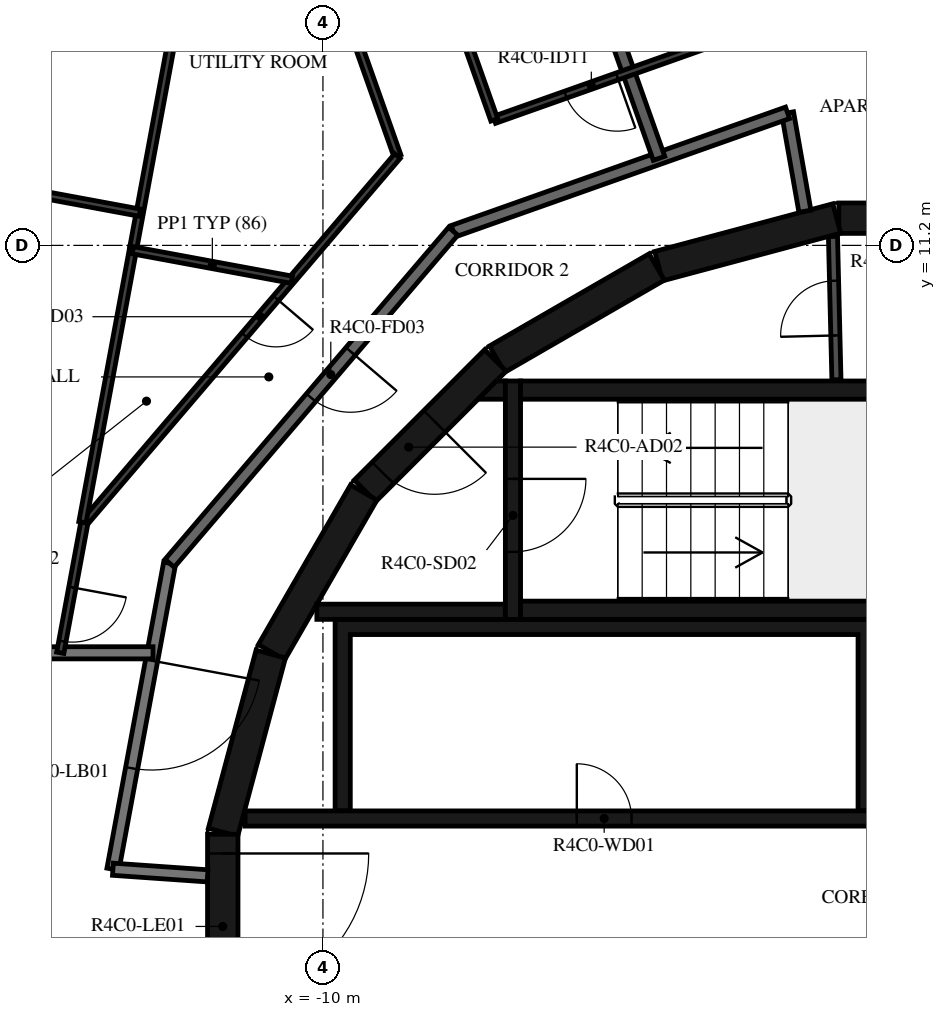
"""IFC4 building model, lengths in metres.
Left out: names, types, materials, properties, quantities, classifications, styles, units other than length and angle.
Written with IfcOpenShell. Run it as: python <this file> out.ifc"""

import sys

from ifc_helpers import new_model, si_unit, direction, frame, frame_2d, origin, place, context, subcontext, project, spatial, polyline, rectangle, outline, extrude, element, fill, save


model = new_model("IFC4")
c1 = context("Model", 3, precision=1e-05, world=origin(), true_north=direction((0.0, 1.0)))
c2 = subcontext(c1, "Body", "Model", "MODEL_VIEW")
j1 = project(units=[si_unit("LENGTHUNIT", "METRE"), si_unit("PLANEANGLEUNIT", "RADIAN")], contexts=[c1])
p1 = place(None, origin())
s1 = spatial("IfcSite", under=j1, at=p1, CompositionType="ELEMENT")
p2 = place(p1, origin())
s2 = spatial("IfcBuilding", under=s1, at=p2, CompositionType="ELEMENT")
p3 = place(p2, frame((0.0, 0.0, 179.7)))
s3 = spatial("IfcBuildingStorey", under=s2, at=p3, CompositionType="ELEMENT", Elevation=179.7)
for number, where, z_axis, x_axis in (
    (1, (1.516, 11.647, 0.0), (0.0, 0.0, 1.0), (-1.0, 0.0, 0.0)),
    (2, (-1.55, 11.643, 0.0), (0.0, 0.0, 1.0), (-0.966, -0.259, 0.0)),
    (3, (-4.51, 10.845, 0.0), (0.0, 0.0, 1.0), (-0.866, -0.5, 0.0)),
):
    element("IfcWall", number, at=place(p3, frame(where, z_axis=z_axis, x_axis=x_axis)), inside=s3, PredefinedType="SHEAR", context=c2, shape_type="SweptSolid", body=[
        extrude(rectangle(XDim=3.033, YDim=0.5, at=frame_2d((1.516, 0.0))), origin(), (0.0, 0.0, 1.0), 3.05),
    ])
p4 = place(p3, frame((-7.164, 9.308, 0.0), z_axis=(0.0, 0.0, 1.0), x_axis=(-0.707106781187, -0.707106781187, 0.0)))
e4 = element("IfcWall", 4, at=p4, inside=s3, PredefinedType="SHEAR", context=c2, shape_type="SweptSolid", body=[
    extrude(rectangle(XDim=3.032, YDim=0.5, at=frame_2d((1.516, 0.0))), origin(), (0.0, 0.0, 1.0), 3.05),
])
p5 = place(p4, frame((1.416, 0.0, 0.0)))
e5 = element("IfcOpeningElement", 5, at=p5, cuts=e4, PredefinedType="OPENING", context=c2, shape_type="SweptSolid", body=[
    extrude(rectangle(XDim=1.2, YDim=2.1, at=frame_2d((0.6, 1.05))), frame((0.0, 0.26, 0.0), z_axis=(0.0, -1.0, 0.0), x_axis=(1.0, 0.0, 0.0)), (0.0, 0.0, 1.0), 0.52),
])
for number, where, z_axis, x_axis in (
    (6, (-9.329, 7.137, 0.0), (0.0, 0.0, 1.0), (-0.5, -0.866, 0.0)),
    (7, (-10.858, 4.479, 0.0), (0.0, 0.0, 1.0), (-0.259, -0.966, 0.0)),
):
    element("IfcWall", number, at=place(p3, frame(where, z_axis=z_axis, x_axis=x_axis)), inside=s3, PredefinedType="SHEAR", context=c2, shape_type="SweptSolid", body=[
        extrude(rectangle(XDim=3.033, YDim=0.5, at=frame_2d((1.516, 0.0))), origin(), (0.0, 0.0, 1.0), 3.05),
    ])
p6 = place(p3, frame((-11.647, 1.516, 0.0), z_axis=(0.0, 0.0, 1.0), x_axis=(0.0, -1.0, 0.0)))
e8 = element("IfcWall", 8, at=p6, inside=s3, PredefinedType="SHEAR", context=c2, shape_type="SweptSolid", body=[
    extrude(rectangle(XDim=3.033, YDim=0.5, at=frame_2d((1.516, 0.0))), origin(), (0.0, 0.0, 1.0), 3.05),
])
p7 = place(p6, frame((0.316, 0.0, 0.0)))
e9 = element("IfcOpeningElement", 9, at=p7, cuts=e8, PredefinedType="OPENING", context=c2, shape_type="SweptSolid", body=[
    extrude(rectangle(XDim=2.4, YDim=2.1, at=frame_2d((1.2, 1.05))), frame((0.0, 0.26, 0.0), z_axis=(0.0, -1.0, 0.0), x_axis=(1.0, 0.0, 0.0)), (0.0, 0.0, 1.0), 0.52),
])
for number, where, z_axis, x_axis in (
    (10, (-6.75, 5.2, 0.0), (0.0, 0.0, 1.0), (1.0, 0.0, 0.0)),
    (11, (-6.75, 8.82, 0.0), (0.0, 0.0, 1.0), (1.0, 0.0, 0.0)),
):
    element("IfcWall", number, at=place(p3, frame(where, z_axis=z_axis, x_axis=x_axis)), inside=s3, PredefinedType="SHEAR", context=c2, shape_type="SweptSolid", body=[
        extrude(rectangle(XDim=6.75, YDim=0.3, at=frame_2d((3.375, 0.0))), origin(), (0.0, 0.0, 1.0), 3.05),
    ])
p8 = place(p3, frame((-6.875, 8.97, 0.0), z_axis=(0.0, 0.0, 1.0), x_axis=(0.0, -1.0, 0.0)))
e12 = element("IfcWall", 12, at=p8, inside=s3, PredefinedType="SHEAR", context=c2, shape_type="SweptSolid", body=[
    extrude(rectangle(XDim=3.92, YDim=0.25, at=frame_2d((1.96, 0.0))), origin(), (0.0, 0.0, 1.0), 3.05),
])
p9 = place(p8, frame((1.61, 0.0, 0.0)))
e13 = element("IfcOpeningElement", 13, at=p9, cuts=e12, PredefinedType="OPENING", context=c2, shape_type="SweptSolid", body=[
    extrude(rectangle(XDim=1.2, YDim=2.1, at=frame_2d((0.6, 1.05))), frame((0.0, 0.135, 0.0), z_axis=(0.0, -1.0, 0.0), x_axis=(1.0, 0.0, 0.0)), (0.0, 0.0, 1.0), 0.27),
])
p10 = place(p3, frame((-7.0, 5.175, 0.0), z_axis=(0.0, 0.0, 1.0), x_axis=(-1.0, 0.0, 0.0)))
e14 = element("IfcWall", 14, at=p10, inside=s3, PredefinedType="SHEAR", context=c2, shape_type="SweptSolid", body=[
    extrude(rectangle(XDim=3.1, YDim=0.25, at=frame_2d((1.55, 0.0))), origin(), (0.0, 0.0, 1.0), 3.05),
])
p11 = place(p3, origin())
e15 = element("IfcWall", 15, at=p11, inside=s3, PredefinedType="SHEAR", context=c2, shape_type="SweptSolid", body=[
    extrude(outline(polyline([(-7.148, 8.97), (-7.0, 8.97), (-7.0, 8.67), (-7.448, 8.67), (-7.148, 8.97)])), origin(), (0.0, 0.0, 1.0), 3.05),
])
p12 = place(p3, origin())
e16 = element("IfcWall", 16, at=p12, inside=s3, PredefinedType="SHEAR", context=c2, shape_type="SweptSolid", body=[
    extrude(outline(polyline([(-9.55, 4.8), (-1.2, 4.8), (-1.2, 1.9), (-0.95, 1.9), (-0.95, 4.8), (0.95, 4.8), (0.95, 1.9), (1.2, 1.9), (1.2, 4.8), (3.1, 4.8), (3.1, 1.9), (3.35, 1.9), (3.35, 4.8), (5.25, 4.8), (5.25, 1.9), (5.5, 1.9), (5.5, 4.8), (7.4, 4.8), (7.4, 1.9), (7.65, 1.9), (7.65, 4.8), (9.55, 4.8), (9.55, 1.9), (9.8, 1.9), (9.8, 4.8), (9.8, 5.05), (-9.8, 5.05), (-9.8, 4.8), (-9.8, 1.9), (-9.55, 1.9), (-9.55, 4.8)])), origin(), (0.0, 0.0, 1.0), 3.05),
])
p13 = place(p3, frame((-11.28, 1.775, 0.0), z_axis=(0.0, 0.0, 1.0), x_axis=(1.0, 0.0, 0.0)))
e17 = element("IfcWall", 17, at=p13, inside=s3, PredefinedType="SHEAR", context=c2, shape_type="SweptSolid", body=[
    extrude(rectangle(XDim=14.38, YDim=0.25, at=frame_2d((7.19, 0.0))), origin(), (0.0, 0.0, 1.0), 3.05),
])
p14 = place(p13, frame((10.73, 0.0, 0.0)))
e18 = element("IfcOpeningElement", 18, at=p14, cuts=e17, PredefinedType="OPENING", context=c2, shape_type="SweptSolid", body=[
    extrude(rectangle(XDim=1.1, YDim=2.1, at=frame_2d((0.55, 1.05))), frame((0.0, 0.135, 0.0), z_axis=(0.0, -1.0, 0.0), x_axis=(1.0, 0.0, 0.0)), (0.0, 0.0, 1.0), 0.27),
])
p15 = place(p13, frame((12.88, 0.0, 0.0)))
e19 = element("IfcOpeningElement", 19, at=p15, cuts=e17, PredefinedType="OPENING", context=c2, shape_type="SweptSolid", body=[
    extrude(rectangle(XDim=1.1, YDim=2.1, at=frame_2d((0.55, 1.05))), frame((0.0, 0.135, 0.0), z_axis=(0.0, -1.0, 0.0), x_axis=(1.0, 0.0, 0.0)), (0.0, 0.0, 1.0), 0.27),
])
p16 = place(p13, frame((5.455, 0.0, 0.0)))
e20 = element("IfcOpeningElement", 20, at=p16, cuts=e17, PredefinedType="OPENING", context=c2, shape_type="SweptSolid", body=[
    extrude(rectangle(XDim=0.9, YDim=2.1, at=frame_2d((0.45, 1.05))), frame((0.0, 0.135, 0.0), z_axis=(0.0, -1.0, 0.0), x_axis=(1.0, 0.0, 0.0)), (0.0, 0.0, 1.0), 0.27),
])
p17 = place(p3, frame((-1.555, 8.99, 0.0), z_axis=(0.0, 0.0, 1.0), x_axis=(-0.024125549686, 0.999708936567, 0.0)))
e21 = element("IfcWall", 21, at=p17, inside=s3, PredefinedType="PARTITIONING", context=c2, shape_type="SweptSolid", body=[
    extrude(rectangle(XDim=2.358, YDim=0.15, at=frame_2d((1.179, 0.0))), origin(), (0.0, 0.0, 1.0), 3.05),
])
p18 = place(p17, frame((0.729, 0.0, 0.0)))
e22 = element("IfcOpeningElement", 22, at=p18, cuts=e21, PredefinedType="OPENING", context=c2, shape_type="SweptSolid", body=[
    extrude(rectangle(XDim=0.9, YDim=2.1, at=frame_2d((0.45, 1.05))), frame((0.0, 0.085, 0.0), z_axis=(0.0, -1.0, 0.0), x_axis=(1.0, 0.0, 0.0)), (0.0, 0.0, 1.0), 0.17),
])
p19 = place(p3, frame((-12.521, 5.972, 0.0), z_axis=(0.0, 0.0, 1.0), x_axis=(-0.182251559718, -0.983251935661, 0.0)))
e23 = element("IfcWall", 23, at=p19, inside=s3, PredefinedType="STANDARD", context=c2, shape_type="SweptSolid", body=[
    extrude(rectangle(XDim=5.117, YDim=0.2, at=frame_2d((2.559, 0.0))), origin(), (0.0, 0.0, 1.0), 3.05),
])
p20 = place(p19, frame((1.627, 0.0, 0.0)))
e24 = element("IfcOpeningElement", 24, at=p20, cuts=e23, PredefinedType="OPENING", context=c2, shape_type="SweptSolid", body=[
    extrude(rectangle(XDim=1.8, YDim=2.1, at=frame_2d((0.9, 1.05))), frame((0.0, 0.11, 0.0), z_axis=(0.0, -1.0, 0.0), x_axis=(1.0, 0.0, 0.0)), (0.0, 0.0, 1.0), 0.22),
])
p21 = place(p3, frame((-13.454, 0.941, 0.0), z_axis=(0.0, 0.0, 1.0), x_axis=(0.99755155062, -0.069934997354, 0.0)))
e25 = element("IfcWall", 25, at=p21, inside=s3, PredefinedType="STANDARD", context=c2, shape_type="SweptSolid", body=[
    extrude(rectangle(XDim=1.561, YDim=0.2, at=frame_2d((0.78, 0.0))), origin(), (0.0, 0.0, 1.0), 3.05),
])
p22 = place(p3, frame((-2.074, 11.761, 0.0), z_axis=(0.0, 0.0, 1.0), x_axis=(-0.1736412798, 0.984808969267, 0.0)))
e26 = element("IfcWall", 26, at=p22, inside=s3, PredefinedType="STANDARD", context=c2, shape_type="SweptSolid", body=[
    extrude(rectangle(XDim=1.644, YDim=0.2, at=frame_2d((0.822, 0.0))), origin(), (0.0, 0.0, 1.0), 3.05),
])
p23 = place(p3, frame((-2.359, 13.38, 0.0), z_axis=(0.0, 0.0, 1.0), x_axis=(-0.942647529236, -0.333789807551, 0.0)))
e27 = element("IfcWall", 27, at=p23, inside=s3, PredefinedType="STANDARD", context=c2, shape_type="SweptSolid", body=[
    extrude(rectangle(XDim=5.833, YDim=0.2, at=frame_2d((2.917, 0.0))), origin(), (0.0, 0.0, 1.0), 3.05),
])
p24 = place(p3, frame((-7.858, 11.433, 0.0), z_axis=(0.0, 0.0, 1.0), x_axis=(-0.649440801937, -0.760412154545, 0.0)))
e28 = element("IfcWall", 28, at=p24, inside=s3, PredefinedType="STANDARD", context=c2, shape_type="SweptSolid", body=[
    extrude(rectangle(XDim=7.181, YDim=0.2, at=frame_2d((3.59, 0.0))), origin(), (0.0, 0.0, 1.0), 3.05),
])
p25 = place(p24, frame((2.6, 0.0, 0.0)))
e29 = element("IfcOpeningElement", 29, at=p25, cuts=e28, PredefinedType="OPENING", context=c2, shape_type="SweptSolid", body=[
    extrude(rectangle(XDim=1.0, YDim=2.1, at=frame_2d((0.5, 1.05))), frame((0.0, 0.11, 0.0), z_axis=(0.0, -1.0, 0.0), x_axis=(1.0, 0.0, 0.0)), (0.0, 0.0, 1.0), 0.22),
])
p26 = place(p3, frame((-12.794, 4.5, 0.0), z_axis=(0.0, 0.0, 1.0), x_axis=(-1.0, 0.0, 0.0)))
e30 = element("IfcWall", 30, at=p26, inside=s3, PredefinedType="STANDARD", context=c2, shape_type="SweptSolid", body=[
    extrude(rectangle(XDim=5.106, YDim=0.2, at=frame_2d((2.553, 0.0))), origin(), (0.0, 0.0, 1.0), 3.05),
])
p27 = place(p3, frame((-5.839, 16.488, 0.0), z_axis=(0.0, 0.0, 1.0), x_axis=(0.333840515054, -0.942629572265, 0.0)))
e31 = element("IfcWall", 31, at=p27, inside=s3, PredefinedType="STANDARD", context=c2, shape_type="SweptSolid", body=[
    extrude(rectangle(XDim=4.092, YDim=0.2, at=frame_2d((2.046, 0.0))), origin(), (0.0, 0.0, 1.0), 3.05),
])
p28 = place(p3, frame((8.702, 12.206, 0.0), z_axis=(0.0, 0.0, 1.0), x_axis=(-0.760401313718, 0.649453494945, 0.0)))
e32 = element("IfcWall", 32, at=p28, inside=s3, PredefinedType="PARTITIONING", context=c2, shape_type="SweptSolid", body=[
    extrude(rectangle(XDim=16.724, YDim=0.12, at=frame_2d((8.362, 0.0))), origin(), (0.0, 0.0, 1.0), 3.05),
])
p29 = place(p28, frame((0.2, 0.0, 0.0)))
e33 = element("IfcOpeningElement", 33, at=p29, cuts=e32, PredefinedType="OPENING", context=c2, shape_type="SweptSolid", body=[
    extrude(rectangle(XDim=0.9, YDim=2.1, at=frame_2d((0.45, 1.05))), frame((0.0, 0.07, 0.0), z_axis=(0.0, -1.0, 0.0), x_axis=(1.0, 0.0, 0.0)), (0.0, 0.0, 1.0), 0.14),
])
p30 = place(p28, frame((8.02, 0.0, 0.0)))
e34 = element("IfcOpeningElement", 34, at=p30, cuts=e32, PredefinedType="OPENING", context=c2, shape_type="SweptSolid", body=[
    extrude(rectangle(XDim=0.9, YDim=2.1, at=frame_2d((0.45, 1.05))), frame((0.0, 0.07, 0.0), z_axis=(0.0, -1.0, 0.0), x_axis=(1.0, 0.0, 0.0)), (0.0, 0.0, 1.0), 0.14),
])
p31 = place(p28, frame((14.412, 0.0, 0.0)))
e35 = element("IfcOpeningElement", 35, at=p31, cuts=e32, PredefinedType="OPENING", context=c2, shape_type="SweptSolid", body=[
    extrude(rectangle(XDim=0.9, YDim=2.1, at=frame_2d((0.45, 1.05))), frame((0.0, 0.07, 0.0), z_axis=(0.0, -1.0, 0.0), x_axis=(1.0, 0.0, 0.0)), (0.0, 0.0, 1.0), 0.14),
])
p32 = place(p3, frame((6.641, 13.923, 0.0), z_axis=(0.0, 0.0, 1.0), x_axis=(-0.983250157272, 0.182261153912, 0.0)))
e36 = element("IfcWall", 36, at=p32, inside=s3, PredefinedType="PARTITIONING", context=c2, shape_type="SweptSolid", body=[
    extrude(rectangle(XDim=7.985, YDim=0.12, at=frame_2d((3.992, 0.0))), origin(), (0.0, 0.0, 1.0), 3.05),
])
p33 = place(p32, frame((1.4, 0.0, 0.0)))
e37 = element("IfcOpeningElement", 37, at=p33, cuts=e36, PredefinedType="OPENING", context=c2, shape_type="SweptSolid", body=[
    extrude(rectangle(XDim=0.8, YDim=2.1, at=frame_2d((0.4, 1.05))), frame((0.0, 0.07, 0.0), z_axis=(0.0, -1.0, 0.0), x_axis=(1.0, 0.0, 0.0)), (0.0, 0.0, 1.0), 0.14),
])
p34 = place(p32, frame((5.069, 0.0, 0.0)))
e38 = element("IfcOpeningElement", 38, at=p34, cuts=e36, PredefinedType="OPENING", context=c2, shape_type="SweptSolid", body=[
    extrude(rectangle(XDim=0.9, YDim=2.1, at=frame_2d((0.45, 1.05))), frame((0.0, 0.07, 0.0), z_axis=(0.0, -1.0, 0.0), x_axis=(1.0, 0.0, 0.0)), (0.0, 0.0, 1.0), 0.14),
])
p35 = place(p3, frame((-2.852, 14.797, 0.0), z_axis=(0.0, 0.0, 1.0), x_axis=(-0.942629664375, -0.333840254973, 0.0)))
e39 = element("IfcWall", 39, at=p35, inside=s3, PredefinedType="PARTITIONING", context=c2, shape_type="SweptSolid", body=[
    extrude(rectangle(XDim=4.593, YDim=0.12, at=frame_2d((2.297, 0.0))), origin(), (0.0, 0.0, 1.0), 3.05),
])
p36 = place(p35, frame((2.451, 0.0, 0.0)))
e40 = element("IfcOpeningElement", 40, at=p36, cuts=e39, PredefinedType="OPENING", context=c2, shape_type="SweptSolid", body=[
    extrude(rectangle(XDim=0.9, YDim=2.1, at=frame_2d((0.45, 1.05))), frame((0.0, 0.07, 0.0), z_axis=(0.0, -1.0, 0.0), x_axis=(1.0, 0.0, 0.0)), (0.0, 0.0, 1.0), 0.14),
])
p37 = place(p3, frame((-7.181, 13.263, 0.0), z_axis=(0.0, 0.0, 1.0), x_axis=(-0.333822798183, 0.942635846663, 0.0)))
e41 = element("IfcWall", 41, at=p37, inside=s3, PredefinedType="PARTITIONING", context=c2, shape_type="SweptSolid", body=[
    extrude(rectangle(XDim=3.527, YDim=0.12, at=frame_2d((1.764, 0.0))), origin(), (0.0, 0.0, 1.0), 3.05),
])
p38 = place(p3, frame((-9.961, 16.021, 0.0), z_axis=(0.0, 0.0, 1.0), x_axis=(0.333803930912, -0.94264252806, 0.0)))
e42 = element("IfcWall", 42, at=p38, inside=s3, PredefinedType="PARTITIONING", context=c2, shape_type="SweptSolid", body=[
    extrude(rectangle(XDim=3.556, YDim=0.12, at=frame_2d((1.778, 0.0))), origin(), (0.0, 0.0, 1.0), 3.05),
])
p39 = place(p3, frame((-8.774, 12.669, 0.0), z_axis=(0.0, 0.0, 1.0), x_axis=(-0.649446157105, -0.760407580855, 0.0)))
e43 = element("IfcWall", 43, at=p39, inside=s3, PredefinedType="PARTITIONING", context=c2, shape_type="SweptSolid", body=[
    extrude(rectangle(XDim=7.927, YDim=0.12, at=frame_2d((3.964, 0.0))), origin(), (0.0, 0.0, 1.0), 3.05),
])
p40 = place(p39, frame((3.074, 0.0, 0.0)))
e44 = element("IfcOpeningElement", 44, at=p40, cuts=e43, PredefinedType="OPENING", context=c2, shape_type="SweptSolid", body=[
    extrude(rectangle(XDim=0.8, YDim=2.1, at=frame_2d((0.4, 1.05))), frame((0.0, 0.07, 0.0), z_axis=(0.0, -1.0, 0.0), x_axis=(1.0, 0.0, 0.0)), (0.0, 0.0, 1.0), 0.14),
])
p41 = place(p3, frame((-13.923, 6.641, 0.0), z_axis=(0.0, 0.0, 1.0), x_axis=(-0.182209715759, -0.983259690765, 0.0)))
e45 = element("IfcWall", 45, at=p41, inside=s3, PredefinedType="PARTITIONING", context=c2, shape_type="SweptSolid", body=[
    extrude(rectangle(XDim=2.177, YDim=0.12, at=frame_2d((1.089, 0.0))), origin(), (0.0, 0.0, 1.0), 3.05),
])
p42 = place(p41, frame((1.083, 0.0, 0.0)))
e46 = element("IfcOpeningElement", 46, at=p42, cuts=e45, PredefinedType="OPENING", context=c2, shape_type="SweptSolid", body=[
    extrude(rectangle(XDim=0.9, YDim=2.1, at=frame_2d((0.45, 1.05))), frame((0.0, 0.07, 0.0), z_axis=(0.0, -1.0, 0.0), x_axis=(1.0, 0.0, 0.0)), (0.0, 0.0, 1.0), 0.14),
])
p43 = place(p3, frame((-13.955, 6.647, 0.0), z_axis=(0.0, 0.0, 1.0), x_axis=(0.182264522222, 0.983249532896, 0.0)))
e47 = element("IfcWall", 47, at=p43, inside=s3, PredefinedType="PARTITIONING", context=c2, shape_type="SweptSolid", body=[
    extrude(rectangle(XDim=4.589, YDim=0.12, at=frame_2d((2.294, 0.0))), origin(), (0.0, 0.0, 1.0), 3.05),
])
p44 = place(p3, frame((-11.396, 20.453, 0.0), z_axis=(0.0, 0.0, 1.0), x_axis=(-0.182223370439, -0.983257160292, 0.0)))
e48 = element("IfcWall", 48, at=p44, inside=s3, PredefinedType="PARTITIONING", context=c2, shape_type="SweptSolid", body=[
    extrude(rectangle(XDim=9.452, YDim=0.12, at=frame_2d((4.726, 0.0))), origin(), (0.0, 0.0, 1.0), 3.05),
])
p45 = place(p44, frame((3.319, 0.0, 0.0)))
e49 = element("IfcOpeningElement", 49, at=p45, cuts=e48, PredefinedType="OPENING", context=c2, shape_type="SweptSolid", body=[
    extrude(rectangle(XDim=0.9, YDim=2.1, at=frame_2d((0.45, 1.05))), frame((0.0, 0.07, 0.0), z_axis=(0.0, -1.0, 0.0), x_axis=(1.0, 0.0, 0.0)), (0.0, 0.0, 1.0), 0.14),
])
p46 = place(p44, frame((0.2, 0.0, 0.0)))
e50 = element("IfcOpeningElement", 50, at=p46, cuts=e48, PredefinedType="OPENING", context=c2, shape_type="SweptSolid", body=[
    extrude(rectangle(XDim=0.9, YDim=2.1, at=frame_2d((0.45, 1.05))), frame((0.0, 0.07, 0.0), z_axis=(0.0, -1.0, 0.0), x_axis=(1.0, 0.0, 0.0)), (0.0, 0.0, 1.0), 0.14),
])
p47 = place(p3, frame((-13.126, 11.12, 0.0), z_axis=(0.0, 0.0, 1.0), x_axis=(0.983257646361, -0.182220747645, 0.0)))
e51 = element("IfcWall", 51, at=p47, inside=s3, PredefinedType="PARTITIONING", context=c2, shape_type="SweptSolid", body=[
    extrude(rectangle(XDim=2.659, YDim=0.12, at=frame_2d((1.33, 0.0))), origin(), (0.0, 0.0, 1.0), 3.05),
])
p48 = place(p3, frame((-16.552, 12.394, 0.0), z_axis=(0.0, 0.0, 1.0), x_axis=(0.983257712156, -0.182220392618, 0.0)))
e52 = element("IfcWall", 52, at=p48, inside=s3, PredefinedType="PARTITIONING", context=c2, shape_type="SweptSolid", body=[
    extrude(rectangle(XDim=3.6, YDim=0.12, at=frame_2d((1.8, 0.0))), origin(), (0.0, 0.0, 1.0), 3.05),
])
p49 = place(p9, origin())
e53 = element("IfcDoor", 53, at=p49, inside=s3, OperationType="SINGLE_SWING_LEFT", PredefinedType="DOOR", context=c2, shape_type="SweptSolid", body=[
    extrude(rectangle(XDim=1.2, YDim=2.1, at=frame_2d((0.6, 1.05))), frame((0.0, 0.025, 0.0), z_axis=(0.0, -1.0, 0.0), x_axis=(1.0, 0.0, 0.0)), (0.0, 0.0, 1.0), 0.05),
])
fill(e13, e53)
p50 = place(p5, origin())
e54 = element("IfcDoor", 54, at=p50, inside=s3, OperationType="SINGLE_SWING_RIGHT", PredefinedType="DOOR", context=c2, shape_type="SweptSolid", body=[
    extrude(rectangle(XDim=1.2, YDim=2.1, at=frame_2d((0.6, 1.05))), frame((0.0, 0.025, 0.0), z_axis=(0.0, -1.0, 0.0), x_axis=(1.0, 0.0, 0.0)), (0.0, 0.0, 1.0), 0.05),
])
fill(e5, e54)
p51 = place(p7, origin())
e55 = element("IfcDoor", 55, at=p51, inside=s3, OperationType="DOUBLE_DOOR_SINGLE_SWING", PredefinedType="DOOR", context=c2, shape_type="SweptSolid", body=[
    extrude(rectangle(XDim=2.4, YDim=2.1, at=frame_2d((1.2, 1.05))), frame((0.0, 0.025, 0.0), z_axis=(0.0, -1.0, 0.0), x_axis=(1.0, 0.0, 0.0)), (0.0, 0.0, 1.0), 0.05),
])
fill(e9, e55)
p52 = place(p16, origin())
e56 = element("IfcDoor", 56, at=p52, inside=s3, OperationType="SINGLE_SWING_LEFT", PredefinedType="DOOR", context=c2, shape_type="SweptSolid", body=[
    extrude(rectangle(XDim=0.9, YDim=2.1, at=frame_2d((0.45, 1.05))), frame((0.0, 0.025, 0.0), z_axis=(0.0, -1.0, 0.0), x_axis=(1.0, 0.0, 0.0)), (0.0, 0.0, 1.0), 0.05),
])
fill(e20, e56)
p53 = place(p18, origin())
e57 = element("IfcDoor", 57, at=p53, inside=s3, OperationType="SINGLE_SWING_RIGHT", PredefinedType="DOOR", context=c2, shape_type="SweptSolid", body=[
    extrude(rectangle(XDim=0.9, YDim=2.1, at=frame_2d((0.45, 1.05))), frame((0.0, 0.025, 0.0), z_axis=(0.0, -1.0, 0.0), x_axis=(1.0, 0.0, 0.0)), (0.0, 0.0, 1.0), 0.05),
])
fill(e22, e57)
p54 = place(p25, origin())
e58 = element("IfcDoor", 58, at=p54, inside=s3, OperationType="SINGLE_SWING_LEFT", PredefinedType="DOOR", context=c2, shape_type="SweptSolid", body=[
    extrude(rectangle(XDim=1.0, YDim=2.1, at=frame_2d((0.5, 1.05))), frame((0.0, 0.025, 0.0), z_axis=(0.0, -1.0, 0.0), x_axis=(1.0, 0.0, 0.0)), (0.0, 0.0, 1.0), 0.05),
])
fill(e29, e58)
p55 = place(p36, origin())
e59 = element("IfcDoor", 59, at=p55, inside=s3, OperationType="SINGLE_SWING_LEFT", PredefinedType="DOOR", context=c2, shape_type="SweptSolid", body=[
    extrude(rectangle(XDim=0.9, YDim=2.1, at=frame_2d((0.45, 1.05))), frame((0.0, 0.025, 0.0), z_axis=(0.0, -1.0, 0.0), x_axis=(1.0, 0.0, 0.0)), (0.0, 0.0, 1.0), 0.05),
])
fill(e40, e59)
p56 = place(p40, origin())
e60 = element("IfcDoor", 60, at=p56, inside=s3, OperationType="SINGLE_SWING_LEFT", PredefinedType="DOOR", context=c2, shape_type="SweptSolid", body=[
    extrude(rectangle(XDim=0.8, YDim=2.1, at=frame_2d((0.4, 1.05))), frame((0.0, 0.025, 0.0), z_axis=(0.0, -1.0, 0.0), x_axis=(1.0, 0.0, 0.0)), (0.0, 0.0, 1.0), 0.05),
])
fill(e44, e60)
p57 = place(p42, origin())
e61 = element("IfcDoor", 61, at=p57, inside=s3, OperationType="SINGLE_SWING_LEFT", PredefinedType="DOOR", context=c2, shape_type="SweptSolid", body=[
    extrude(rectangle(XDim=0.9, YDim=2.1, at=frame_2d((0.45, 1.05))), frame((0.0, 0.025, 0.0), z_axis=(0.0, -1.0, 0.0), x_axis=(1.0, 0.0, 0.0)), (0.0, 0.0, 1.0), 0.05),
])
fill(e46, e61)
p58 = place(p20, origin())
e62 = element("IfcDoor", 62, at=p58, inside=s3, OperationType="DOUBLE_DOOR_SINGLE_SWING", PredefinedType="DOOR", context=c2, shape_type="SweptSolid", body=[
    extrude(rectangle(XDim=1.8, YDim=2.1, at=frame_2d((0.9, 1.05))), frame((0.0, 0.025, 0.0), z_axis=(0.0, -1.0, 0.0), x_axis=(1.0, 0.0, 0.0)), (0.0, 0.0, 1.0), 0.05),
])
fill(e24, e62)
save(model, sys.argv[1])
